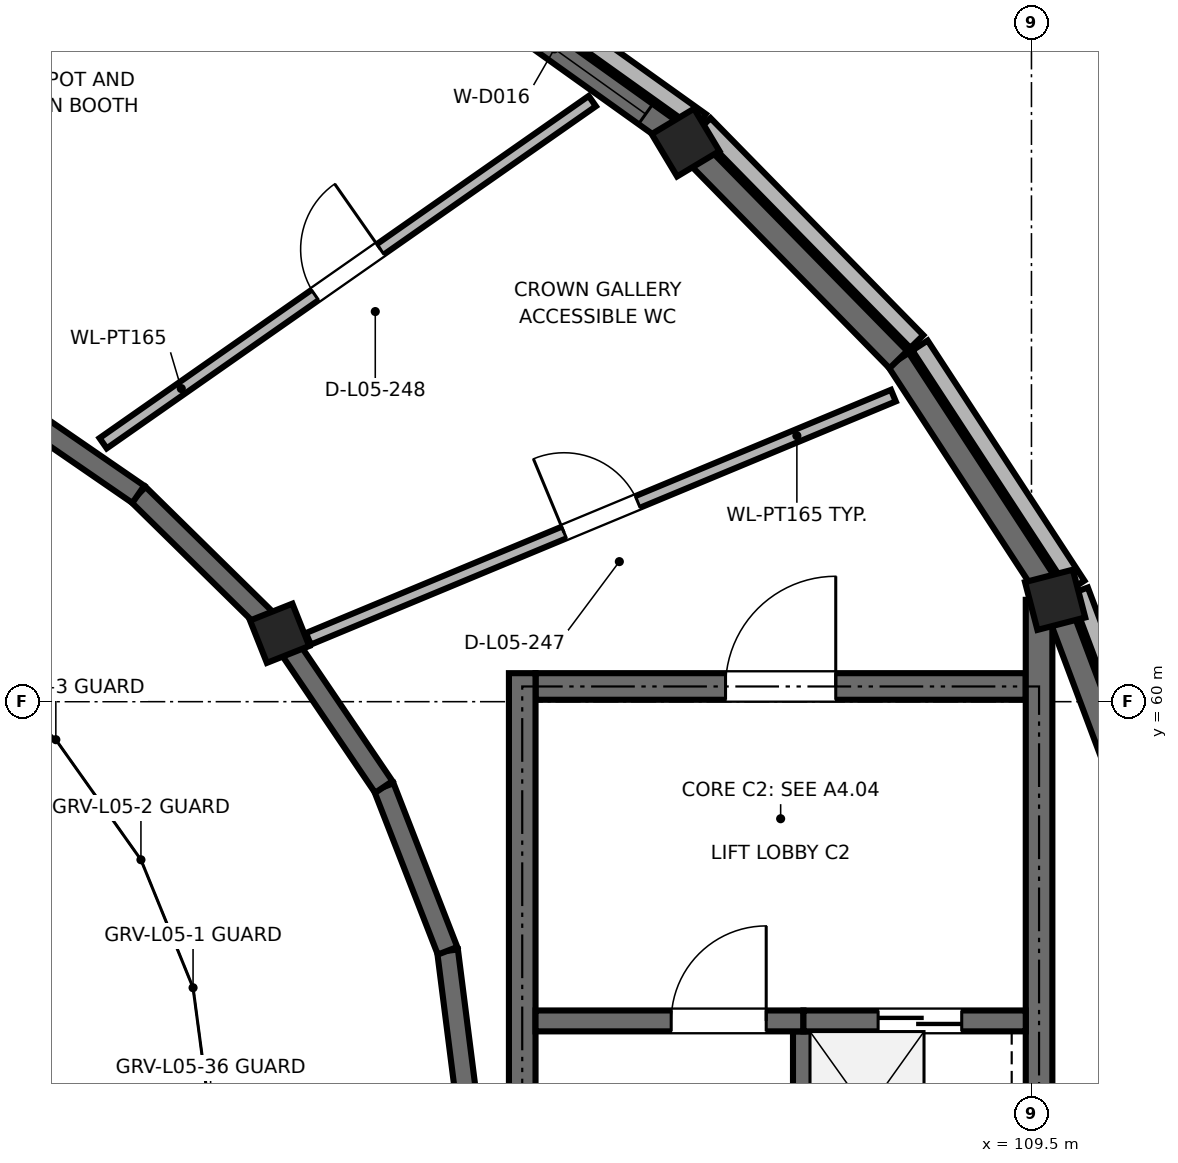
"""IFC4 building model, lengths in metres.
Left out: names, types, materials, properties, quantities, classifications, styles, units other than length and angle.
Written with IfcOpenShell. Run it as: python <this file> out.ifc"""

import sys

from ifc_helpers import new_model, si_unit, direction, frame, frame_2d, origin, origin_2d, place, context, subcontext, project, spatial, polyline, rectangle, circle, outline, extrude, element, fill, save


model = new_model("IFC4")
c1 = context("Model", 3, precision=1e-05, world=origin(), true_north=direction((0.0, 1.0)))
c2 = subcontext(c1, "Body", "Model", "MODEL_VIEW")
j1 = project(units=[si_unit("LENGTHUNIT", "METRE"), si_unit("PLANEANGLEUNIT", "RADIAN")], contexts=[c1])
p1 = place(None, origin())
s1 = spatial("IfcSite", under=j1, at=p1, CompositionType="ELEMENT")
p2 = place(p1, origin())
s2 = spatial("IfcBuilding", under=s1, at=p2, CompositionType="ELEMENT")
p3 = place(p2, frame((0.0, 0.0, 22.8)))
s3 = spatial("IfcBuildingStorey", under=s2, at=p3, CompositionType="ELEMENT", Elevation=22.8)
for number, where, z_axis, x_axis in (
    (1, (109.811, 61.34, 0.0), (0.0, 0.0, 1.0), (0.968, 0.252, 0.0)),
    (2, (104.949, 67.356, 0.0), (0.0, 0.0, 1.0), (0.858, 0.514, 0.0)),
):
    element("IfcColumn", number, at=place(p3, frame(where, z_axis=z_axis, x_axis=x_axis)), inside=s3, PredefinedType="COLUMN", context=c2, shape_type="SweptSolid", body=[
        extrude(rectangle(XDim=0.65, YDim=0.65, at=origin_2d()), origin(), (0.0, 0.0, 1.0), 4.2),
    ])
p4 = place(p3, frame((99.608, 60.9, 0.0), z_axis=(0.0, 0.0, 1.0), x_axis=(0.929326043111, 0.369260213935, 0.0)))
e3 = element("IfcColumn", 3, at=p4, inside=s3, PredefinedType="COLUMN", context=c2, shape_type="SweptSolid", body=[
    extrude(circle(Radius=0.3, at=origin_2d()), origin(), (0.0, 0.0, 1.0), 4.2),
])
p5 = place(p3, frame((111.075, 57.973, 0.0), z_axis=(0.0, 0.0, 1.0), x_axis=(-0.351279653979, 0.936270583058, 0.0)))
e4 = element("IfcWall", 4, at=p5, inside=s3, PredefinedType="SHEAR", context=c2, shape_type="SweptSolid", body=[
    extrude(rectangle(XDim=3.597, YDim=0.325, at=frame_2d((1.798, 0.0))), origin(), (0.0, 0.0, 1.0), 4.2),
])
p6 = place(p3, frame((109.811, 61.34, 0.0), z_axis=(0.0, 0.0, 1.0), x_axis=(-0.546611158382, 0.837386554425, 0.0)))
e5 = element("IfcWall", 5, at=p6, inside=s3, PredefinedType="SHEAR", context=c2, shape_type="SweptSolid", body=[
    extrude(rectangle(XDim=3.773, YDim=0.325, at=frame_2d((1.887, 0.0))), origin(), (0.0, 0.0, 1.0), 4.2),
])
p7 = place(p3, frame((107.749, 64.5, 0.0), z_axis=(0.0, 0.0, 1.0), x_axis=(-0.700051268358, 0.714092586203, 0.0)))
e6 = element("IfcWall", 6, at=p7, inside=s3, PredefinedType="SHEAR", context=c2, shape_type="SweptSolid", body=[
    extrude(rectangle(XDim=3.999, YDim=0.325, at=frame_2d((2.0, 0.0))), origin(), (0.0, 0.0, 1.0), 4.2),
])
p8 = place(p3, frame((104.949, 67.356, 0.0), z_axis=(0.0, 0.0, 1.0), x_axis=(-0.813737360708, 0.581232748378, 0.0)))
e7 = element("IfcWall", 7, at=p8, inside=s3, PredefinedType="SHEAR", context=c2, shape_type="SweptSolid", body=[
    extrude(rectangle(XDim=4.241, YDim=0.325, at=frame_2d((2.121, 0.0))), origin(), (0.0, 0.0, 1.0), 4.2),
])
p9 = place(p8, frame((0.646, 0.0, 1.45)))
e8 = element("IfcOpeningElement", 8, at=p9, cuts=e7, PredefinedType="OPENING", context=c2, shape_type="SweptSolid", body=[
    extrude(rectangle(XDim=2.95, YDim=1.15, at=frame_2d((1.475, 0.575))), frame((0.0, 0.172, 0.0), z_axis=(0.0, -1.0, 0.0), x_axis=(1.0, 0.0, 0.0)), (0.0, 0.0, 1.0), 0.345),
])
p10 = place(p3, frame((102.1, 54.5, 0.0), z_axis=(0.0, 0.0, 1.0), x_axis=(-0.126180195213, 0.992007337844, 0.0)))
e9 = element("IfcWall", 9, at=p10, inside=s3, PredefinedType="SHEAR", context=c2, shape_type="SweptSolid", body=[
    extrude(rectangle(XDim=2.24, YDim=0.275, at=frame_2d((1.12, 0.0))), origin(), (0.0, 0.0, 1.0), 3.4),
])
p11 = place(p3, frame((101.817, 56.723, 0.0), z_axis=(0.0, 0.0, 1.0), x_axis=(-0.362802811216, 0.931865934657, 0.0)))
e10 = element("IfcWall", 10, at=p11, inside=s3, PredefinedType="SHEAR", context=c2, shape_type="SweptSolid", body=[
    extrude(rectangle(XDim=2.313, YDim=0.275, at=frame_2d((1.156, 0.0))), origin(), (0.0, 0.0, 1.0), 3.4),
])
p12 = place(p3, frame((100.978, 58.878, 0.0), z_axis=(0.0, 0.0, 1.0), x_axis=(-0.560958648975, 0.827843822312, 0.0)))
e11 = element("IfcWall", 11, at=p12, inside=s3, PredefinedType="SHEAR", context=c2, shape_type="SweptSolid", body=[
    extrude(rectangle(XDim=2.442, YDim=0.275, at=frame_2d((1.221, 0.0))), origin(), (0.0, 0.0, 1.0), 3.4),
])
p13 = place(p3, frame((99.608, 60.9, 0.0), z_axis=(0.0, 0.0, 1.0), x_axis=(-0.713212431679, 0.700947949065, 0.0)))
e12 = element("IfcWall", 12, at=p13, inside=s3, PredefinedType="SHEAR", context=c2, shape_type="SweptSolid", body=[
    extrude(rectangle(XDim=2.608, YDim=0.275, at=frame_2d((1.304, 0.0))), origin(), (0.0, 0.0, 1.0), 3.4),
])
p14 = place(p3, frame((97.748, 62.728, 0.0), z_axis=(0.0, 0.0, 1.0), x_axis=(-0.823780742291, 0.566908536388, 0.0)))
e13 = element("IfcWall", 13, at=p14, inside=s3, PredefinedType="SHEAR", context=c2, shape_type="SweptSolid", body=[
    extrude(rectangle(XDim=2.783, YDim=0.275, at=frame_2d((1.392, 0.0))), origin(), (0.0, 0.0, 1.0), 3.4),
])
p15 = place(p3, frame((111.393, 58.092, 3.8), z_axis=(0.0, 0.0, 1.0), x_axis=(-0.351220147955, 0.936292906985, 0.0)))
e14 = element("IfcWall", 14, at=p15, inside=s3, PredefinedType="SOLIDWALL", context=c2, shape_type="SweptSolid", body=[
    extrude(outline(polyline([(0.0, 0.0), (3.597, 0.0), (3.596, 7.791), (0.0, 8.554), (0.0, 0.0)])), frame((0.0, 0.12, 0.0), z_axis=(0.0, -1.0, 0.0), x_axis=(1.0, 0.0, 0.0)), (0.0, 0.0, 1.0), 0.24),
])
p16 = place(p3, frame((110.096, 61.526, 3.8), z_axis=(0.0, 0.0, 1.0), x_axis=(-0.546686144595, 0.837337601752, 0.0)))
e15 = element("IfcWall", 15, at=p16, inside=s3, PredefinedType="SOLIDWALL", context=c2, shape_type="SweptSolid", body=[
    extrude(outline(polyline([(0.0, 0.0), (3.773, 0.0), (3.773, 6.62), (0.0, 7.791), (0.0, 0.0)])), frame((0.0, 0.12, 0.0), z_axis=(0.0, -1.0, 0.0), x_axis=(1.0, 0.0, 0.0)), (0.0, 0.0, 1.0), 0.24),
])
p17 = place(p3, frame((107.991, 64.738, 3.8), z_axis=(0.0, 0.0, 1.0), x_axis=(-0.700051268358, 0.714092586203, 0.0)))
e16 = element("IfcWall", 16, at=p17, inside=s3, PredefinedType="SOLIDWALL", context=c2, shape_type="SweptSolid", body=[
    extrude(outline(polyline([(0.0, 0.0), (3.999, 0.0), (3.999, 5.184), (0.0, 6.62), (0.0, 0.0)])), frame((0.0, 0.12, 0.0), z_axis=(0.0, -1.0, 0.0), x_axis=(1.0, 0.0, 0.0)), (0.0, 0.0, 1.0), 0.24),
])
p18 = place(p3, frame((105.147, 67.633, 3.8), z_axis=(0.0, 0.0, 1.0), x_axis=(-0.813717912107, 0.581259975843, 0.0)))
e17 = element("IfcWall", 17, at=p18, inside=s3, PredefinedType="SOLIDWALL", context=c2, shape_type="SweptSolid", body=[
    extrude(outline(polyline([(0.0, 0.0), (4.241, 0.0), (4.241, 3.656), (0.0, 5.184), (0.0, 0.0)])), frame((0.0, 0.12, 0.0), z_axis=(0.0, -1.0, 0.0), x_axis=(1.0, 0.0, 0.0)), (0.0, 0.0, 1.0), 0.24),
])
p19 = place(p3, frame((102.975, 60.2, 0.0), z_axis=(0.0, 0.0, 1.0), x_axis=(1.0, 0.0, 0.0)))
e18 = element("IfcWall", 18, at=p19, inside=s3, PredefinedType="SHEAR", context=c2, shape_type="SweptSolid", body=[
    extrude(rectangle(XDim=6.45, YDim=0.35, at=frame_2d((3.225, 0.0))), origin(), (0.0, 0.0, 1.0), 3.98),
])
p20 = place(p19, frame((2.5, 0.0, 0.0)))
e19 = element("IfcOpeningElement", 19, at=p20, cuts=e18, PredefinedType="OPENING", context=c2, shape_type="SweptSolid", body=[
    extrude(rectangle(XDim=1.45, YDim=2.2, at=frame_2d((0.725, 1.1))), frame((0.0, 0.185, 0.0), z_axis=(0.0, -1.0, 0.0), x_axis=(1.0, 0.0, 0.0)), (0.0, 0.0, 1.0), 0.37),
])
p21 = place(p3, frame((102.8, 48.775, 0.0), z_axis=(0.0, 0.0, 1.0), x_axis=(0.0, 1.0, 0.0)))
e20 = element("IfcWall", 20, at=p21, inside=s3, PredefinedType="SHEAR", context=c2, shape_type="SweptSolid", body=[
    extrude(rectangle(XDim=11.6, YDim=0.35, at=frame_2d((5.8, 0.0))), origin(), (0.0, 0.0, 1.0), 3.98),
])
p22 = place(p3, frame((109.6, 48.775, 0.0), z_axis=(0.0, 0.0, 1.0), x_axis=(0.0, 1.0, 0.0)))
e21 = element("IfcWall", 21, at=p22, inside=s3, PredefinedType="SHEAR", context=c2, shape_type="SweptSolid", body=[
    extrude(rectangle(XDim=12.565, YDim=0.35, at=frame_2d((6.283, 0.0))), origin(), (0.0, 0.0, 1.0), 3.98),
])
p23 = place(p3, frame((106.5, 48.775, 0.0), z_axis=(0.0, 0.0, 1.0), x_axis=(0.0, 1.0, 0.0)))
e22 = element("IfcWall", 22, at=p23, inside=s3, PredefinedType="SHEAR", context=c2, shape_type="SweptSolid", body=[
    extrude(rectangle(XDim=6.888, YDim=0.275, at=frame_2d((3.444, 0.0))), origin(), (0.0, 0.0, 1.0), 3.98),
])
p24 = place(p3, frame((102.975, 55.8, 0.0), z_axis=(0.0, 0.0, 1.0), x_axis=(1.0, 0.0, 0.0)))
e23 = element("IfcWall", 23, at=p24, inside=s3, PredefinedType="SHEAR", context=c2, shape_type="SweptSolid", body=[
    extrude(rectangle(XDim=3.525, YDim=0.275, at=frame_2d((1.762, 0.0))), origin(), (0.0, 0.0, 1.0), 3.98),
])
p25 = place(p24, frame((1.785, 0.0, 0.0)))
e24 = element("IfcOpeningElement", 24, at=p25, cuts=e23, PredefinedType="OPENING", context=c2, shape_type="SweptSolid", body=[
    extrude(rectangle(XDim=1.25, YDim=2.15, at=frame_2d((0.625, 1.075))), frame((0.0, 0.147, 0.0), z_axis=(0.0, -1.0, 0.0), x_axis=(1.0, 0.0, 0.0)), (0.0, 0.0, 1.0), 0.295),
])
p26 = place(p3, frame((106.5, 55.8, 0.0), z_axis=(0.0, 0.0, 1.0), x_axis=(1.0, 0.0, 0.0)))
e25 = element("IfcWall", 25, at=p26, inside=s3, PredefinedType="SHEAR", context=c2, shape_type="SweptSolid", body=[
    extrude(rectangle(XDim=2.925, YDim=0.275, at=frame_2d((1.462, 0.0))), origin(), (0.0, 0.0, 1.0), 3.98),
])
p27 = place(p26, frame((0.982, 0.0, 0.0)))
e26 = element("IfcOpeningElement", 26, at=p27, cuts=e25, PredefinedType="OPENING", context=c2, shape_type="SweptSolid", body=[
    extrude(rectangle(XDim=1.1, YDim=2.15, at=frame_2d((0.55, 1.075))), frame((0.0, 0.147, 0.0), z_axis=(0.0, -1.0, 0.0), x_axis=(1.0, 0.0, 0.0)), (0.0, 0.0, 1.0), 0.295),
])
p28 = place(p3, frame((99.987, 60.827, 0.0), z_axis=(0.0, 0.0, 1.0), x_axis=(0.923382534701, 0.383881094363, 0.0)))
e27 = element("IfcWall", 27, at=p28, inside=s3, PredefinedType="PARTITIONING", context=c2, shape_type="SweptSolid", body=[
    extrude(rectangle(XDim=8.335, YDim=0.165, at=frame_2d((4.167, 0.0))), origin(), (0.0, 0.0, 1.0), 3.974),
])
p29 = place(p28, frame((3.643, 0.0, 0.0)))
e28 = element("IfcOpeningElement", 28, at=p29, cuts=e27, PredefinedType="OPENING", context=c2, shape_type="SweptSolid", body=[
    extrude(rectangle(XDim=1.05, YDim=2.15, at=frame_2d((0.525, 1.075))), frame((0.0, 0.093, 0.0), z_axis=(0.0, -1.0, 0.0), x_axis=(1.0, 0.0, 0.0)), (0.0, 0.0, 1.0), 0.185),
])
p30 = place(p3, frame((97.286, 63.4, 0.0), z_axis=(0.0, 0.0, 1.0), x_axis=(0.819471352116, 0.573120147142, 0.0)))
e29 = element("IfcWall", 29, at=p30, inside=s3, PredefinedType="PARTITIONING", context=c2, shape_type="SweptSolid", body=[
    extrude(rectangle(XDim=7.854, YDim=0.165, at=frame_2d((3.927, 0.0))), origin(), (0.0, 0.0, 1.0), 3.974),
])
p31 = place(p30, frame((3.402, 0.0, 0.0)))
e30 = element("IfcOpeningElement", 30, at=p31, cuts=e29, PredefinedType="OPENING", context=c2, shape_type="SweptSolid", body=[
    extrude(rectangle(XDim=1.05, YDim=2.15, at=frame_2d((0.525, 1.075))), frame((0.0, 0.093, 0.0), z_axis=(0.0, -1.0, 0.0), x_axis=(1.0, 0.0, 0.0)), (0.0, 0.0, 1.0), 0.185),
])
p32 = place(p9, origin())
e31 = element("IfcWindow", 31, at=p32, inside=s3, PartitioningType="SINGLE_PANEL", PredefinedType="WINDOW", context=c2, shape_type="SweptSolid", body=[
    extrude(rectangle(XDim=2.95, YDim=1.15, at=frame_2d((1.475, 0.575))), frame((0.0, 0.03, 0.0), z_axis=(0.0, -1.0, 0.0), x_axis=(1.0, 0.0, 0.0)), (0.0, 0.0, 1.0), 0.06),
])
fill(e8, e31)
p33 = place(p25, origin())
e32 = element("IfcDoor", 32, at=p33, inside=s3, OperationType="SINGLE_SWING_RIGHT", PredefinedType="DOOR", context=c2, shape_type="SweptSolid", body=[
    extrude(rectangle(XDim=1.25, YDim=2.15, at=frame_2d((0.625, 1.075))), frame((0.0, 0.025, 0.0), z_axis=(0.0, -1.0, 0.0), x_axis=(1.0, 0.0, 0.0)), (0.0, 0.0, 1.0), 0.05),
])
fill(e24, e32)
p34 = place(p27, origin())
e33 = element("IfcDoor", 33, at=p34, inside=s3, OperationType="DOUBLE_DOOR_SLIDING", PredefinedType="DOOR", context=c2, shape_type="SweptSolid", body=[
    extrude(rectangle(XDim=1.1, YDim=2.15, at=frame_2d((0.55, 1.075))), frame((0.0, 0.025, 0.0), z_axis=(0.0, -1.0, 0.0), x_axis=(1.0, 0.0, 0.0)), (0.0, 0.0, 1.0), 0.05),
])
fill(e26, e33)
p35 = place(p20, origin())
e34 = element("IfcDoor", 34, at=p35, inside=s3, OperationType="SINGLE_SWING_RIGHT", PredefinedType="DOOR", context=c2, shape_type="SweptSolid", body=[
    extrude(rectangle(XDim=1.45, YDim=2.2, at=frame_2d((0.725, 1.1))), frame((0.0, 0.025, 0.0), z_axis=(0.0, -1.0, 0.0), x_axis=(1.0, 0.0, 0.0)), (0.0, 0.0, 1.0), 0.05),
])
fill(e19, e34)
p36 = place(p29, origin())
e35 = element("IfcDoor", 35, at=p36, inside=s3, OperationType="SINGLE_SWING_LEFT", PredefinedType="DOOR", context=c2, shape_type="SweptSolid", body=[
    extrude(rectangle(XDim=1.05, YDim=2.15, at=frame_2d((0.525, 1.075))), frame((0.0, 0.025, 0.0), z_axis=(0.0, -1.0, 0.0), x_axis=(1.0, 0.0, 0.0)), (0.0, 0.0, 1.0), 0.05),
])
fill(e28, e35)
p37 = place(p31, origin())
e36 = element("IfcDoor", 36, at=p37, inside=s3, OperationType="SINGLE_SWING_RIGHT", PredefinedType="DOOR", context=c2, shape_type="SweptSolid", body=[
    extrude(rectangle(XDim=1.05, YDim=2.15, at=frame_2d((0.525, 1.075))), frame((0.0, 0.025, 0.0), z_axis=(0.0, -1.0, 0.0), x_axis=(1.0, 0.0, 0.0)), (0.0, 0.0, 1.0), 0.05),
])
fill(e30, e36)
save(model, sys.argv[1])
